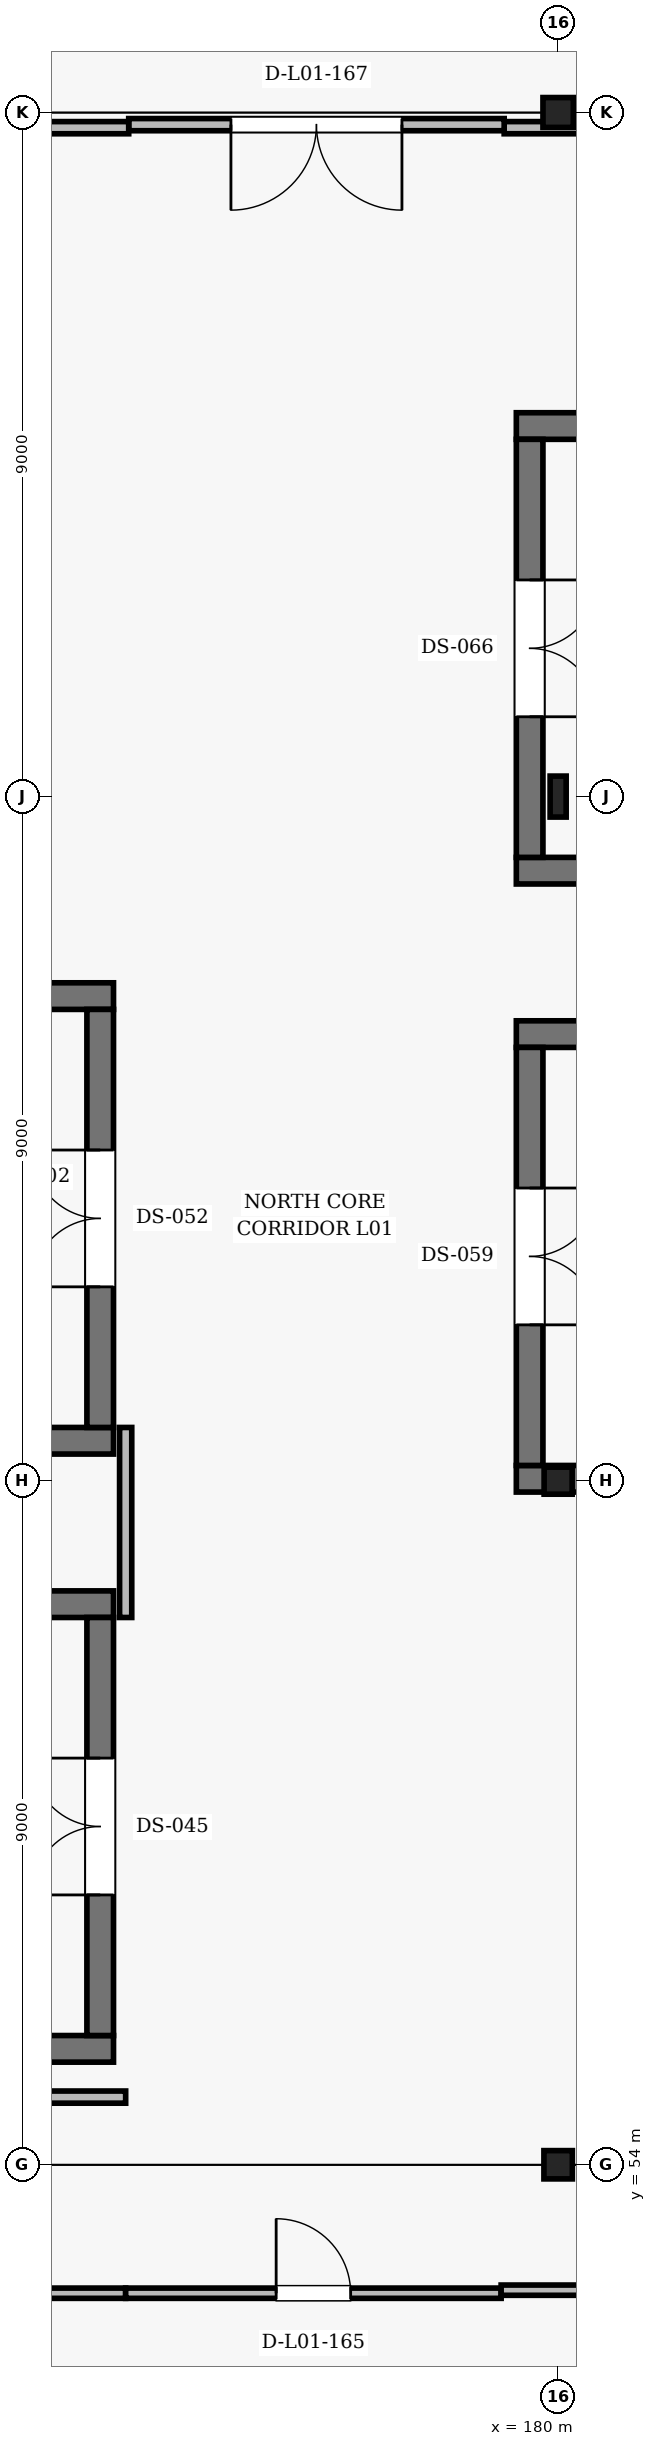
"""IFC4 building model, lengths in metres.
Left out: names, types, materials, properties, quantities, classifications, styles, units other than length and angle.
Written with IfcOpenShell. Run it as: python <this file> out.ifc"""

import sys

from ifc_helpers import new_model, si_unit, direction, frame, frame_2d, origin, origin_2d, place, context, subcontext, project, spatial, rectangle, i_section, extrude, element, fill, save


model = new_model("IFC4")
c1 = context("Model", 3, precision=1e-05, world=origin(), true_north=direction((0.0, 1.0)))
c2 = subcontext(c1, "Body", "Model", "MODEL_VIEW")
j1 = project(units=[si_unit("LENGTHUNIT", "METRE"), si_unit("PLANEANGLEUNIT", "RADIAN")], contexts=[c1])
p1 = place(None, origin())
s1 = spatial("IfcSite", under=j1, at=p1, CompositionType="ELEMENT")
p2 = place(p1, origin())
s2 = spatial("IfcBuilding", under=s1, at=p2, CompositionType="ELEMENT")
p3 = place(p2, frame((0.0, 0.0, 5.4)))
s3 = spatial("IfcBuildingStorey", under=s2, at=p3, CompositionType="ELEMENT", Elevation=5.4)
p4 = place(p3, frame((180.0, 54.0, 0.0), z_axis=(0.0, 0.0, 1.0), x_axis=(1.0, 0.0, 0.0)))
e1 = element("IfcColumn", 1, at=p4, inside=s3, PredefinedType="COLUMN", context=c2, shape_type="SweptSolid", body=[
    extrude(i_section(OverallWidth=0.374, OverallDepth=0.372, WebThickness=0.016, FlangeThickness=0.026, FilletRadius=0.016, at=origin_2d()), origin(), (0.0, 0.0, 1.0), 5.4),
])
p5 = place(p3, frame((180.0, 63.0, 0.0), z_axis=(0.0, 0.0, 1.0), x_axis=(1.0, 0.0, 0.0)))
e2 = element("IfcColumn", 2, at=p5, inside=s3, PredefinedType="COLUMN", context=c2, shape_type="SweptSolid", body=[
    extrude(i_section(OverallWidth=0.369, OverallDepth=0.356, WebThickness=0.011, FlangeThickness=0.018, FilletRadius=0.015, at=origin_2d()), origin(), (0.0, 0.0, 1.0), 5.4),
])
p6 = place(p3, frame((180.0, 72.0, 0.0), z_axis=(0.0, 0.0, 1.0), x_axis=(1.0, 0.0, 0.0)))
e3 = element("IfcColumn", 3, at=p6, inside=s3, PredefinedType="COLUMN", context=c2, shape_type="SweptSolid", body=[
    extrude(i_section(OverallWidth=0.211, OverallDepth=0.539, WebThickness=0.012, FlangeThickness=0.019, FilletRadius=0.014, at=origin_2d()), origin(), (0.0, 0.0, 1.0), 5.4),
])
p7 = place(p3, frame((180.0, 81.0, 0.0), z_axis=(0.0, 0.0, 1.0), x_axis=(1.0, 0.0, 0.0)))
e4 = element("IfcColumn", 4, at=p7, inside=s3, PredefinedType="COLUMN", context=c2, shape_type="SweptSolid", body=[
    extrude(i_section(OverallWidth=0.399, OverallDepth=0.393, WebThickness=0.023, FlangeThickness=0.037, FilletRadius=0.018, at=origin_2d()), origin(), (0.0, 0.0, 1.0), 5.4),
])
for number, where, z_axis, x_axis in (
    (5, (162.05, 55.525, 0.0), (0.0, 0.0, 1.0), (1.0, 0.0, 0.0)),
    (6, (174.15, 61.375, 0.0), (0.0, 0.0, 1.0), (-1.0, 0.0, 0.0)),
):
    element("IfcWall", number, at=place(p3, frame(where, z_axis=z_axis, x_axis=x_axis)), inside=s3, PredefinedType="SHEAR", context=c2, shape_type="SweptSolid", body=[
        extrude(rectangle(XDim=12.1, YDim=0.35, at=frame_2d((6.05, 0.0))), origin(), (0.0, 0.0, 1.0), 5.18),
    ])
p8 = place(p3, frame((173.975, 55.7, 0.0), z_axis=(0.0, 0.0, 1.0), x_axis=(0.0, 1.0, 0.0)))
e7 = element("IfcWall", 7, at=p8, inside=s3, PredefinedType="SHEAR", context=c2, shape_type="SweptSolid", body=[
    extrude(rectangle(XDim=5.5, YDim=0.35, at=frame_2d((2.75, 0.0))), origin(), (0.0, 0.0, 1.0), 5.18),
])
p9 = place(p8, frame((1.85, 0.0, 0.0)))
e8 = element("IfcOpeningElement", 8, at=p9, cuts=e7, PredefinedType="OPENING", context=c2, shape_type="SweptSolid", body=[
    extrude(rectangle(XDim=1.8, YDim=2.2, at=frame_2d((0.9, 1.1))), frame((0.0, 0.185, 0.0), z_axis=(0.0, -1.0, 0.0), x_axis=(1.0, 0.0, 0.0)), (0.0, 0.0, 1.0), 0.37),
])
for number, where, z_axis, x_axis in (
    (9, (162.05, 63.525, 0.0), (0.0, 0.0, 1.0), (1.0, 0.0, 0.0)),
    (10, (174.15, 69.375, 0.0), (0.0, 0.0, 1.0), (-1.0, 0.0, 0.0)),
):
    element("IfcWall", number, at=place(p3, frame(where, z_axis=z_axis, x_axis=x_axis)), inside=s3, PredefinedType="SHEAR", context=c2, shape_type="SweptSolid", body=[
        extrude(rectangle(XDim=12.1, YDim=0.35, at=frame_2d((6.05, 0.0))), origin(), (0.0, 0.0, 1.0), 5.18),
    ])
p10 = place(p3, frame((173.975, 63.7, 0.0), z_axis=(0.0, 0.0, 1.0), x_axis=(0.0, 1.0, 0.0)))
e11 = element("IfcWall", 11, at=p10, inside=s3, PredefinedType="SHEAR", context=c2, shape_type="SweptSolid", body=[
    extrude(rectangle(XDim=5.5, YDim=0.35, at=frame_2d((2.75, 0.0))), origin(), (0.0, 0.0, 1.0), 5.18),
])
p11 = place(p10, frame((1.85, 0.0, 0.0)))
e12 = element("IfcOpeningElement", 12, at=p11, cuts=e11, PredefinedType="OPENING", context=c2, shape_type="SweptSolid", body=[
    extrude(rectangle(XDim=1.8, YDim=2.2, at=frame_2d((0.9, 1.1))), frame((0.0, 0.185, 0.0), z_axis=(0.0, -1.0, 0.0), x_axis=(1.0, 0.0, 0.0)), (0.0, 0.0, 1.0), 0.37),
])
p12 = place(p3, frame((179.45, 63.025, 0.0), z_axis=(0.0, 0.0, 1.0), x_axis=(1.0, 0.0, 0.0)))
e13 = element("IfcWall", 13, at=p12, inside=s3, PredefinedType="SHEAR", context=c2, shape_type="SweptSolid", body=[
    extrude(rectangle(XDim=12.373, YDim=0.35, at=frame_2d((6.186, 0.0))), origin(), (0.0, 0.0, 1.0), 5.18),
])
p13 = place(p3, frame((191.55, 68.875, 0.0), z_axis=(0.0, 0.0, 1.0), x_axis=(-1.0, 0.0, 0.0)))
e14 = element("IfcWall", 14, at=p13, inside=s3, PredefinedType="SHEAR", context=c2, shape_type="SweptSolid", body=[
    extrude(rectangle(XDim=12.1, YDim=0.35, at=frame_2d((6.05, 0.0))), origin(), (0.0, 0.0, 1.0), 5.18),
])
p14 = place(p3, frame((179.625, 68.7, 0.0), z_axis=(0.0, 0.0, 1.0), x_axis=(0.0, -1.0, 0.0)))
e15 = element("IfcWall", 15, at=p14, inside=s3, PredefinedType="SHEAR", context=c2, shape_type="SweptSolid", body=[
    extrude(rectangle(XDim=5.5, YDim=0.35, at=frame_2d((2.75, 0.0))), origin(), (0.0, 0.0, 1.0), 5.18),
])
p15 = place(p14, frame((1.85, 0.0, 0.0)))
e16 = element("IfcOpeningElement", 16, at=p15, cuts=e15, PredefinedType="OPENING", context=c2, shape_type="SweptSolid", body=[
    extrude(rectangle(XDim=1.8, YDim=2.2, at=frame_2d((0.9, 1.1))), frame((0.0, 0.185, 0.0), z_axis=(0.0, -1.0, 0.0), x_axis=(1.0, 0.0, 0.0)), (0.0, 0.0, 1.0), 0.37),
])
for number, where, z_axis, x_axis in (
    (17, (179.45, 71.025, 0.0), (0.0, 0.0, 1.0), (1.0, 0.0, 0.0)),
    (18, (191.55, 76.875, 0.0), (0.0, 0.0, 1.0), (-1.0, 0.0, 0.0)),
):
    element("IfcWall", number, at=place(p3, frame(where, z_axis=z_axis, x_axis=x_axis)), inside=s3, PredefinedType="SHEAR", context=c2, shape_type="SweptSolid", body=[
        extrude(rectangle(XDim=12.1, YDim=0.35, at=frame_2d((6.05, 0.0))), origin(), (0.0, 0.0, 1.0), 5.18),
    ])
p16 = place(p3, frame((179.625, 76.7, 0.0), z_axis=(0.0, 0.0, 1.0), x_axis=(0.0, -1.0, 0.0)))
e19 = element("IfcWall", 19, at=p16, inside=s3, PredefinedType="SHEAR", context=c2, shape_type="SweptSolid", body=[
    extrude(rectangle(XDim=5.5, YDim=0.35, at=frame_2d((2.75, 0.0))), origin(), (0.0, 0.0, 1.0), 5.18),
])
p17 = place(p16, frame((1.85, 0.0, 0.0)))
e20 = element("IfcOpeningElement", 20, at=p17, cuts=e19, PredefinedType="OPENING", context=c2, shape_type="SweptSolid", body=[
    extrude(rectangle(XDim=1.8, YDim=2.2, at=frame_2d((0.9, 1.1))), frame((0.0, 0.185, 0.0), z_axis=(0.0, -1.0, 0.0), x_axis=(1.0, 0.0, 0.0)), (0.0, 0.0, 1.0), 0.37),
])
p18 = place(p3, frame((174.31, 63.7, 0.0), z_axis=(0.0, 0.0, 1.0), x_axis=(0.0, -1.0, 0.0)))
e21 = element("IfcWall", 21, at=p18, inside=s3, PredefinedType="PARTITIONING", context=c2, shape_type="SweptSolid", body=[
    extrude(rectangle(XDim=2.5, YDim=0.16, at=frame_2d((1.25, 0.0))), origin(), (0.0, 0.0, 1.0), 4.554),
])
p19 = place(p3, frame((174.31, 54.89, 0.0), z_axis=(0.0, 0.0, 1.0), x_axis=(-1.0, 0.0, 0.0)))
e22 = element("IfcWall", 22, at=p19, inside=s3, PredefinedType="PARTITIONING", context=c2, shape_type="SweptSolid", body=[
    extrude(rectangle(XDim=14.96, YDim=0.16, at=frame_2d((7.48, 0.0))), origin(), (0.0, 0.0, 1.0), 4.481),
])
p20 = place(p3, frame((171.0, 52.31, 0.0), z_axis=(0.0, 0.0, 1.0), x_axis=(1.0, 0.0, 0.0)))
e23 = element("IfcWall", 23, at=p20, inside=s3, PredefinedType="PARTITIONING", context=c2, shape_type="SweptSolid", body=[
    extrude(rectangle(XDim=3.31, YDim=0.135, at=frame_2d((1.655, 0.0))), origin(), (0.0, 0.0, 1.0), 4.27),
])
p21 = place(p3, frame((174.31, 52.31, 0.0), z_axis=(0.0, 0.0, 1.0), x_axis=(1.0, 0.0, 0.0)))
e24 = element("IfcWall", 24, at=p21, inside=s3, PredefinedType="PARTITIONING", context=c2, shape_type="SweptSolid", body=[
    extrude(rectangle(XDim=4.94, YDim=0.135, at=frame_2d((2.47, 0.0))), origin(), (0.0, 0.0, 1.0), 4.668),
])
p22 = place(p21, frame((1.98, 0.0, 0.0)))
e25 = element("IfcOpeningElement", 25, at=p22, cuts=e24, PredefinedType="OPENING", context=c2, shape_type="SweptSolid", body=[
    extrude(rectangle(XDim=0.98, YDim=2.15, at=frame_2d((0.49, 1.075))), frame((0.0, 0.078, 0.0), z_axis=(0.0, -1.0, 0.0), x_axis=(1.0, 0.0, 0.0)), (0.0, 0.0, 1.0), 0.155),
])
p23 = place(p3, frame((179.25, 52.35, 0.0), z_axis=(0.0, 0.0, 1.0), x_axis=(1.0, 0.0, 0.0)))
e26 = element("IfcWall", 26, at=p23, inside=s3, PredefinedType="PARTITIONING", context=c2, shape_type="SweptSolid", body=[
    extrude(rectangle(XDim=12.738, YDim=0.135, at=frame_2d((6.369, 0.0))), origin(), (0.0, 0.0, 1.0), 4.27),
])
p24 = place(p3, frame((191.44, 80.8, 0.0), z_axis=(0.0, 0.0, 1.0), x_axis=(-1.0, 0.0, 0.0)))
e27 = element("IfcWall", 27, at=p24, inside=s3, PredefinedType="PARTITIONING", context=c2, shape_type="SweptSolid", body=[
    extrude(rectangle(XDim=12.15, YDim=0.16, at=frame_2d((6.075, 0.0))), origin(), (0.0, 0.0, 1.0), 4.392),
])
p25 = place(p3, frame((179.29, 80.84, 0.0), z_axis=(0.0, 0.0, 1.0), x_axis=(-1.0, 0.0, 0.0)))
e28 = element("IfcWall", 28, at=p25, inside=s3, PredefinedType="PARTITIONING", context=c2, shape_type="SweptSolid", body=[
    extrude(rectangle(XDim=4.94, YDim=0.16, at=frame_2d((2.47, 0.0))), origin(), (0.0, 0.0, 1.0), 4.392),
])
p26 = place(p25, frame((1.345, 0.0, 0.0)))
e29 = element("IfcOpeningElement", 29, at=p26, cuts=e28, PredefinedType="OPENING", context=c2, shape_type="SweptSolid", body=[
    extrude(rectangle(XDim=2.25, YDim=2.4, at=frame_2d((1.125, 1.2))), frame((0.0, 0.09, 0.0), z_axis=(0.0, -1.0, 0.0), x_axis=(1.0, 0.0, 0.0)), (0.0, 0.0, 1.0), 0.18),
])
p27 = place(p3, frame((174.35, 80.8, 0.0), z_axis=(0.0, 0.0, 1.0), x_axis=(-1.0, 0.0, 0.0)))
e30 = element("IfcWall", 30, at=p27, inside=s3, PredefinedType="PARTITIONING", context=c2, shape_type="SweptSolid", body=[
    extrude(rectangle(XDim=20.79, YDim=0.16, at=frame_2d((10.395, 0.0))), origin(), (0.0, 0.0, 1.0), 4.392),
])
p28 = place(p9, origin())
e31 = element("IfcDoor", 31, at=p28, inside=s3, OperationType="DOUBLE_DOOR_SINGLE_SWING", PredefinedType="DOOR", context=c2, shape_type="SweptSolid", body=[
    extrude(rectangle(XDim=1.8, YDim=2.2, at=frame_2d((0.9, 1.1))), frame((0.0, 0.025, 0.0), z_axis=(0.0, -1.0, 0.0), x_axis=(1.0, 0.0, 0.0)), (0.0, 0.0, 1.0), 0.05),
])
fill(e8, e31)
p29 = place(p11, origin())
e32 = element("IfcDoor", 32, at=p29, inside=s3, OperationType="DOUBLE_DOOR_SINGLE_SWING", PredefinedType="DOOR", context=c2, shape_type="SweptSolid", body=[
    extrude(rectangle(XDim=1.8, YDim=2.2, at=frame_2d((0.9, 1.1))), frame((0.0, 0.025, 0.0), z_axis=(0.0, -1.0, 0.0), x_axis=(1.0, 0.0, 0.0)), (0.0, 0.0, 1.0), 0.05),
])
fill(e12, e32)
p30 = place(p15, origin())
e33 = element("IfcDoor", 33, at=p30, inside=s3, OperationType="DOUBLE_DOOR_SINGLE_SWING", PredefinedType="DOOR", context=c2, shape_type="SweptSolid", body=[
    extrude(rectangle(XDim=1.8, YDim=2.2, at=frame_2d((0.9, 1.1))), frame((0.0, 0.025, 0.0), z_axis=(0.0, -1.0, 0.0), x_axis=(1.0, 0.0, 0.0)), (0.0, 0.0, 1.0), 0.05),
])
fill(e16, e33)
p31 = place(p17, origin())
e34 = element("IfcDoor", 34, at=p31, inside=s3, OperationType="DOUBLE_DOOR_SINGLE_SWING", PredefinedType="DOOR", context=c2, shape_type="SweptSolid", body=[
    extrude(rectangle(XDim=1.8, YDim=2.2, at=frame_2d((0.9, 1.1))), frame((0.0, 0.025, 0.0), z_axis=(0.0, -1.0, 0.0), x_axis=(1.0, 0.0, 0.0)), (0.0, 0.0, 1.0), 0.05),
])
fill(e20, e34)
p32 = place(p22, origin())
e35 = element("IfcDoor", 35, at=p32, inside=s3, OperationType="SINGLE_SWING_LEFT", PredefinedType="DOOR", context=c2, shape_type="SweptSolid", body=[
    extrude(rectangle(XDim=0.98, YDim=2.15, at=frame_2d((0.49, 1.075))), frame((0.0, 0.025, 0.0), z_axis=(0.0, -1.0, 0.0), x_axis=(1.0, 0.0, 0.0)), (0.0, 0.0, 1.0), 0.05),
])
fill(e25, e35)
p33 = place(p26, origin())
e36 = element("IfcDoor", 36, at=p33, inside=s3, OperationType="DOUBLE_DOOR_SINGLE_SWING", PredefinedType="DOOR", context=c2, shape_type="SweptSolid", body=[
    extrude(rectangle(XDim=2.25, YDim=2.4, at=frame_2d((1.125, 1.2))), frame((0.0, 0.025, 0.0), z_axis=(0.0, -1.0, 0.0), x_axis=(1.0, 0.0, 0.0)), (0.0, 0.0, 1.0), 0.05),
])
fill(e29, e36)
save(model, sys.argv[1])
